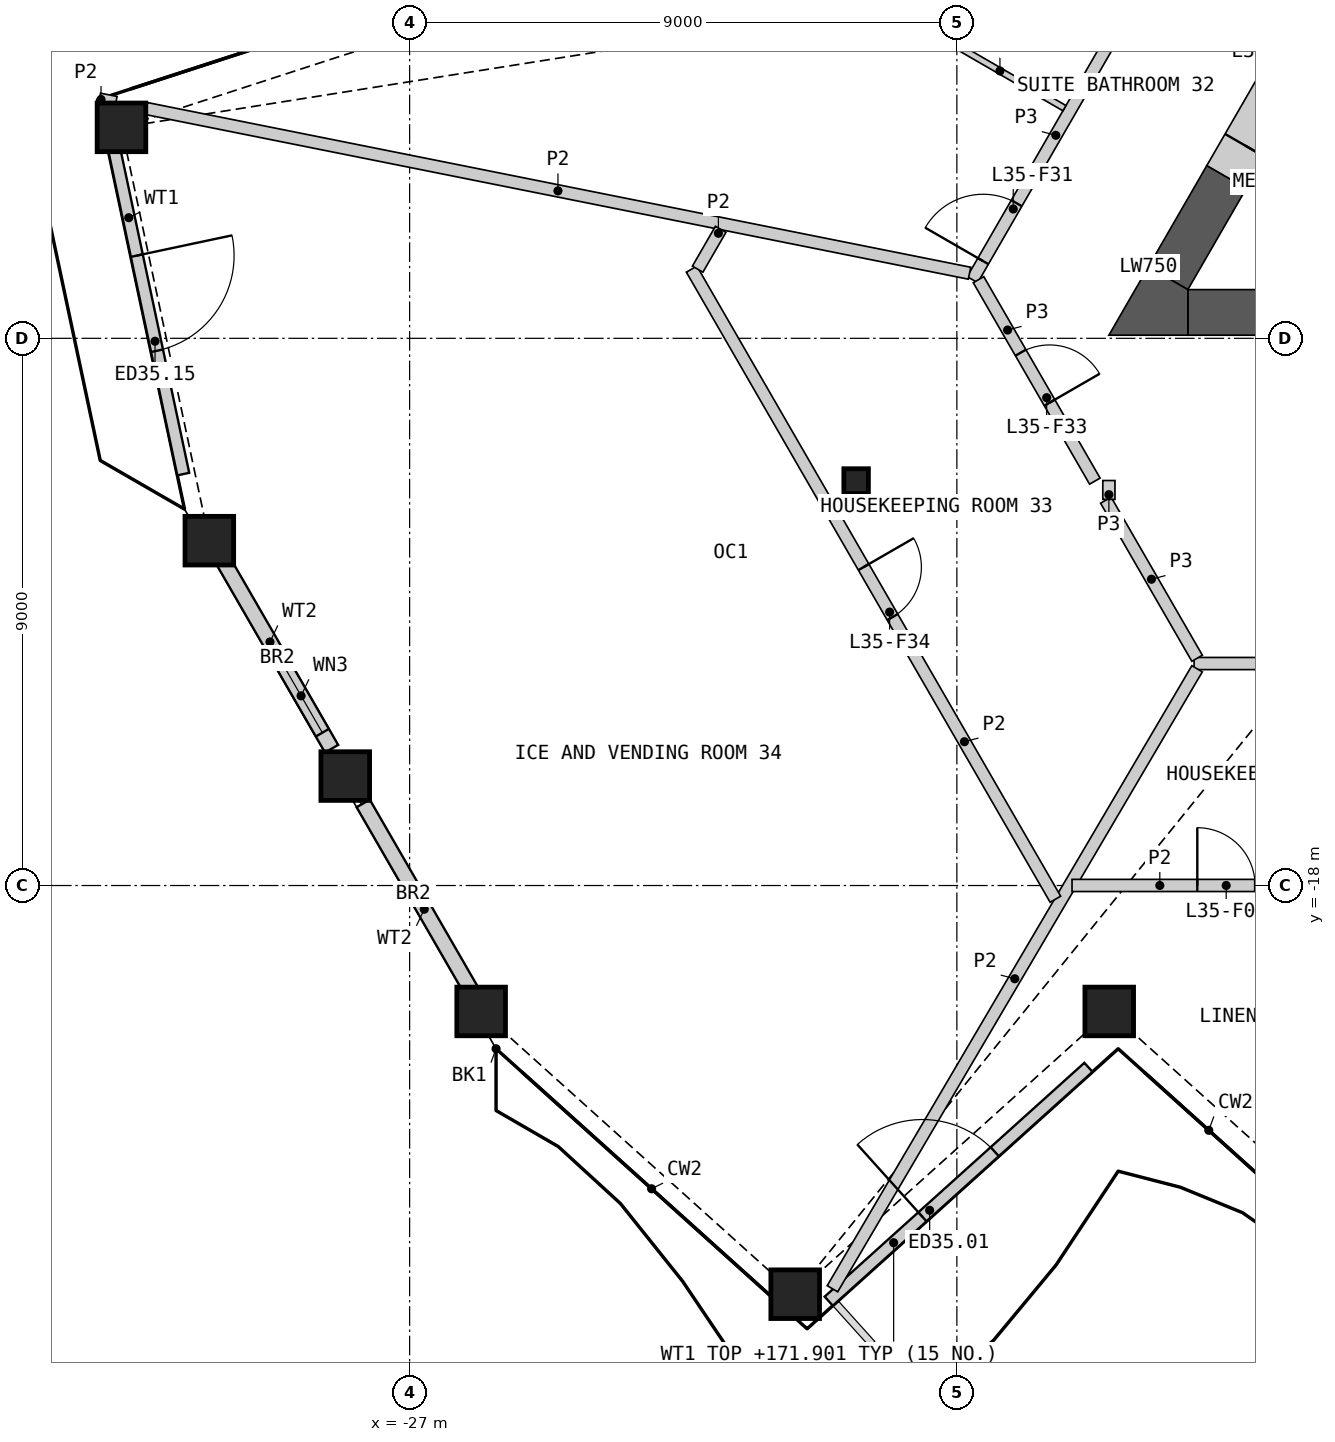
"""IFC4 building model, lengths in metres.
Left out: names, types, materials, properties, quantities, classifications, styles, units other than length and angle.
Written with IfcOpenShell. Run it as: python <this file> out.ifc"""

import sys

from ifc_helpers import new_model, si_unit, direction, frame, frame_2d, origin, origin_2d, place, context, subcontext, project, spatial, polyline, rectangle, hollow_rectangle, i_section, outline, extrude, element, fill, save


model = new_model("IFC4")
c1 = context("Model", 3, precision=1e-05, world=origin(), true_north=direction((0.0, 1.0)))
c2 = subcontext(c1, "Body", "Model", "MODEL_VIEW")
j1 = project(units=[si_unit("LENGTHUNIT", "METRE"), si_unit("PLANEANGLEUNIT", "RADIAN")], contexts=[c1])
p1 = place(None, origin())
s1 = spatial("IfcSite", under=j1, at=p1, CompositionType="ELEMENT")
p2 = place(p1, origin())
s2 = spatial("IfcBuilding", under=s1, at=p2, CompositionType="ELEMENT")
p3 = place(p2, frame((0.0, 0.0, 169.2)))
s3 = spatial("IfcBuildingStorey", under=s2, at=p3, CompositionType="ELEMENT", Elevation=169.2)
for number, where, z_axis, x_axis in (
    (1, (-25.823, -20.071, 0.0), (0.0, 0.0, 1.0), (1.0, 0.0, 0.0)),
    (2, (-20.659, -24.722, 0.0), (0.0, 0.0, 1.0), (1.0, 0.0, 0.0)),
    (3, (-15.494, -20.071, 0.0), (0.0, 0.0, 1.0), (1.0, 0.0, 0.0)),
    (4, (-31.739, -5.53, 0.0), (0.0, 0.0, 1.0), (1.0, 0.0, 0.0)),
    (5, (-30.294, -12.328, 0.0), (0.0, 0.0, 1.0), (1.0, 0.0, 0.0)),
    (6, (-28.059, -16.2, 0.0), (0.0, 0.0, 1.0), (1.0, 0.0, 0.0)),
):
    element("IfcColumn", number, at=place(p3, frame(where, z_axis=z_axis, x_axis=x_axis)), inside=s3, PredefinedType="COLUMN", context=c2, shape_type="SweptSolid", body=[
        extrude(hollow_rectangle(XDim=0.8, YDim=0.8, WallThickness=0.05, at=origin_2d()), origin(), (0.0, 0.0, 1.0), 3.6),
    ])
p4 = place(p3, frame((-19.657, -11.349, 0.0), z_axis=(0.0, 0.0, 1.0), x_axis=(1.0, 0.0, 0.0)))
e7 = element("IfcColumn", 7, at=p4, inside=s3, PredefinedType="COLUMN", context=c2, shape_type="SweptSolid", body=[
    extrude(i_section(OverallWidth=0.404, OverallDepth=0.407, WebThickness=0.027, FlangeThickness=0.044, at=origin_2d()), origin(), (0.0, 0.0, 1.0), 3.6),
])
p5 = place(p3, frame((-20.108, -24.836, 0.0), z_axis=(0.0, 0.0, 1.0), x_axis=(0.74315473474, 0.669119600844, 0.0)))
e8 = element("IfcWall", 8, at=p5, inside=s3, PredefinedType="SOLIDWALL", context=c2, shape_type="SweptSolid", body=[
    extrude(rectangle(XDim=5.748, YDim=0.2, at=frame_2d((2.874, 0.0))), origin(), (0.0, 0.0, 1.0), 2.701),
])
p6 = place(p5, frame((2.074, 0.0, 0.0)))
e9 = element("IfcOpeningElement", 9, at=p6, cuts=e8, PredefinedType="OPENING", context=c2, shape_type="SweptSolid", body=[
    extrude(rectangle(XDim=1.6, YDim=2.4, at=frame_2d((0.8, 1.2))), frame((0.0, 0.11, 0.0), z_axis=(0.0, -1.0, 0.0), x_axis=(1.0, 0.0, 0.0)), (0.0, 0.0, 1.0), 0.22),
])
p7 = place(p3, frame((-31.918, -5.611, 0.0), z_axis=(0.0, 0.0, 1.0), x_axis=(0.207913110781, -0.97814729891, 0.0)))
e10 = element("IfcWall", 10, at=p7, inside=s3, PredefinedType="SOLIDWALL", context=c2, shape_type="SweptSolid", body=[
    extrude(rectangle(XDim=5.748, YDim=0.2, at=frame_2d((2.874, 0.0))), origin(), (0.0, 0.0, 1.0), 2.701),
])
p8 = place(p7, frame((2.074, 0.0, 0.0)))
e11 = element("IfcOpeningElement", 11, at=p8, cuts=e10, PredefinedType="OPENING", context=c2, shape_type="SweptSolid", body=[
    extrude(rectangle(XDim=1.6, YDim=2.4, at=frame_2d((0.8, 1.2))), frame((0.0, 0.11, 0.0), z_axis=(0.0, -1.0, 0.0), x_axis=(1.0, 0.0, 0.0)), (0.0, 0.0, 1.0), 0.22),
])
p9 = place(p3, frame((-30.31, -12.239, 0.0), z_axis=(0.0, 0.0, 1.0), x_axis=(0.500005680777, -0.866022123962, 0.0)))
e12 = element("IfcWall", 12, at=p9, inside=s3, PredefinedType="SOLIDWALL", context=c2, shape_type="SweptSolid", body=[
    extrude(rectangle(XDim=4.054, YDim=0.25, at=frame_2d((2.027, 0.0))), origin(), (0.0, 0.0, 1.0), 2.701),
])
p10 = place(p9, frame((2.35, 0.0, 1.7)))
e13 = element("IfcOpeningElement", 13, at=p10, cuts=e12, PredefinedType="OPENING", context=c2, shape_type="SweptSolid", body=[
    extrude(rectangle(XDim=1.4, YDim=0.8, at=frame_2d((0.7, 0.4))), frame((0.0, 0.135, 0.0), z_axis=(0.0, -1.0, 0.0), x_axis=(1.0, 0.0, 0.0)), (0.0, 0.0, 1.0), 0.27),
])
p11 = place(p3, frame((-27.764, -16.65, 0.0), z_axis=(0.0, 0.0, 1.0), x_axis=(0.500039726511, -0.866002466458, 0.0)))
e14 = element("IfcWall", 14, at=p11, inside=s3, PredefinedType="SOLIDWALL", context=c2, shape_type="SweptSolid", body=[
    extrude(rectangle(XDim=4.019, YDim=0.25, at=frame_2d((2.009, 0.0))), origin(), (0.0, 0.0, 1.0), 2.701),
])
p12 = place(p3, frame((-14.201, -8.574, 0.0), z_axis=(0.0, 0.0, 1.0), x_axis=(1.0, 0.0, 0.0)))
e15 = element("IfcWall", 15, at=p12, inside=s3, PredefinedType="SHEAR", context=c2, shape_type="SweptSolid", body=[
    extrude(rectangle(XDim=6.785, YDim=0.75, at=frame_2d((3.393, 0.0))), origin(), (0.0, 0.0, 1.0), 3.25),
])
p13 = place(p3, frame((-13.564, -6.346, 0.0), z_axis=(0.0, 0.0, 1.0), x_axis=(-0.499989888488, -0.86603124159, 0.0)))
e16 = element("IfcWall", 16, at=p13, inside=s3, PredefinedType="SHEAR", context=c2, shape_type="SweptSolid", body=[
    extrude(rectangle(XDim=1.923, YDim=0.75, at=frame_2d((0.961, 0.0))), origin(), (0.0, 0.0, 1.0), 3.25),
])
p14 = place(p3, origin())
e17 = element("IfcWall", 17, at=p14, inside=s3, PredefinedType="SHEAR", context=c2, shape_type="SweptSolid", body=[
    extrude(outline(polyline([(-14.851, -7.824), (-14.201, -8.199), (-14.201, -8.949), (-15.5, -8.949), (-14.851, -7.824)])), origin(), (0.0, 0.0, 1.0), 3.25),
])
p15 = place(p3, frame((-12.464, -4.441, 0.0), z_axis=(0.0, 0.0, 1.0), x_axis=(-0.499994660107, -0.866028486751, 0.0)))
e18 = element("IfcWall", 18, at=p15, inside=s3, PredefinedType="SHEAR", context=c2, shape_type="SweptSolid", body=[
    extrude(rectangle(XDim=2.2, YDim=0.75, at=frame_2d((1.1, 0.0))), origin(), (0.0, 0.0, 1.0), 3.25),
])
p16 = place(p15, frame((0.6, 0.0, 0.0)))
e19 = element("IfcOpeningElement", 19, at=p16, cuts=e18, PredefinedType="OPENING", context=c2, shape_type="SweptSolid", body=[
    extrude(rectangle(XDim=1.0, YDim=2.1, at=frame_2d((0.5, 1.05))), frame((0.0, 0.385, 0.0), z_axis=(0.0, -1.0, 0.0), x_axis=(1.0, 0.0, 0.0)), (0.0, 0.0, 1.0), 0.77),
])
p17 = place(p3, frame((-14.099, -14.349, 0.0), z_axis=(0.0, 0.0, 1.0), x_axis=(1.0, 0.0, 0.0)))
e20 = element("IfcWall", 20, at=p17, inside=s3, PredefinedType="PARTITIONING", context=c2, shape_type="SweptSolid", body=[
    extrude(rectangle(XDim=28.198, YDim=0.2, at=frame_2d((14.099, 0.0))), origin(), (0.0, 0.0, 1.0), 3.25),
])
p18 = place(p17, frame((1.552, 0.0, 0.0)))
e21 = element("IfcOpeningElement", 21, at=p18, cuts=e20, PredefinedType="OPENING", context=c2, shape_type="SweptSolid", body=[
    extrude(rectangle(XDim=0.95, YDim=2.1, at=frame_2d((0.475, 1.05))), frame((0.0, 0.11, 0.0), z_axis=(0.0, -1.0, 0.0), x_axis=(1.0, 0.0, 0.0)), (0.0, 0.0, 1.0), 0.22),
])
p19 = place(p17, frame((7.677, 0.0, 0.0)))
e22 = element("IfcOpeningElement", 22, at=p19, cuts=e20, PredefinedType="OPENING", context=c2, shape_type="SweptSolid", body=[
    extrude(rectangle(XDim=1.0, YDim=2.1, at=frame_2d((0.5, 1.05))), frame((0.0, 0.11, 0.0), z_axis=(0.0, -1.0, 0.0), x_axis=(1.0, 0.0, 0.0)), (0.0, 0.0, 1.0), 0.22),
])
p20 = place(p17, frame((9.283, 0.0, 0.0)))
e23 = element("IfcOpeningElement", 23, at=p20, cuts=e20, PredefinedType="OPENING", context=c2, shape_type="SweptSolid", body=[
    extrude(rectangle(XDim=1.0, YDim=2.1, at=frame_2d((0.5, 1.05))), frame((0.0, 0.11, 0.0), z_axis=(0.0, -1.0, 0.0), x_axis=(1.0, 0.0, 0.0)), (0.0, 0.0, 1.0), 0.22),
])
p21 = place(p17, frame((17.915, 0.0, 0.0)))
e24 = element("IfcOpeningElement", 24, at=p21, cuts=e20, PredefinedType="OPENING", context=c2, shape_type="SweptSolid", body=[
    extrude(rectangle(XDim=1.0, YDim=2.1, at=frame_2d((0.5, 1.05))), frame((0.0, 0.11, 0.0), z_axis=(0.0, -1.0, 0.0), x_axis=(1.0, 0.0, 0.0)), (0.0, 0.0, 1.0), 0.22),
])
p22 = place(p17, frame((19.521, 0.0, 0.0)))
e25 = element("IfcOpeningElement", 25, at=p22, cuts=e20, PredefinedType="OPENING", context=c2, shape_type="SweptSolid", body=[
    extrude(rectangle(XDim=1.0, YDim=2.1, at=frame_2d((0.5, 1.05))), frame((0.0, 0.11, 0.0), z_axis=(0.0, -1.0, 0.0), x_axis=(1.0, 0.0, 0.0)), (0.0, 0.0, 1.0), 0.22),
])
p23 = place(p17, frame((25.696, 0.0, 0.0)))
e26 = element("IfcOpeningElement", 26, at=p23, cuts=e20, PredefinedType="OPENING", context=c2, shape_type="SweptSolid", body=[
    extrude(rectangle(XDim=0.95, YDim=2.1, at=frame_2d((0.475, 1.05))), frame((0.0, 0.11, 0.0), z_axis=(0.0, -1.0, 0.0), x_axis=(1.0, 0.0, 0.0)), (0.0, 0.0, 1.0), 0.22),
])
p24 = place(p3, frame((-17.744, -8.035, 0.0), z_axis=(0.0, 0.0, 1.0), x_axis=(0.500007607708, 0.866021011428, 0.0)))
e27 = element("IfcWall", 27, at=p24, inside=s3, PredefinedType="PARTITIONING", context=c2, shape_type="SweptSolid", body=[
    extrude(rectangle(XDim=5.484, YDim=0.2, at=frame_2d((2.742, 0.0))), origin(), (0.0, 0.0, 1.0), 3.25),
])
p25 = place(p24, frame((0.352, 0.0, 0.0)))
e28 = element("IfcOpeningElement", 28, at=p25, cuts=e27, PredefinedType="OPENING", context=c2, shape_type="SweptSolid", body=[
    extrude(rectangle(XDim=1.1, YDim=2.1, at=frame_2d((0.55, 1.05))), frame((0.0, 0.11, 0.0), z_axis=(0.0, -1.0, 0.0), x_axis=(1.0, 0.0, 0.0)), (0.0, 0.0, 1.0), 0.22),
])
p26 = place(p3, frame((-17.644, -8.035, 0.0), z_axis=(0.0, 0.0, 1.0), x_axis=(0.499961815444, -0.866047448526, 0.0)))
e29 = element("IfcWall", 29, at=p26, inside=s3, PredefinedType="PARTITIONING", context=c2, shape_type="SweptSolid", body=[
    extrude(rectangle(XDim=3.826, YDim=0.2, at=frame_2d((1.913, 0.0))), origin(), (0.0, 0.0, 1.0), 3.25),
])
p27 = place(p26, frame((1.386, 0.0, 0.0)))
e30 = element("IfcOpeningElement", 30, at=p27, cuts=e29, PredefinedType="OPENING", context=c2, shape_type="SweptSolid", body=[
    extrude(rectangle(XDim=0.95, YDim=2.1, at=frame_2d((0.475, 1.05))), frame((0.0, 0.11, 0.0), z_axis=(0.0, -1.0, 0.0), x_axis=(1.0, 0.0, 0.0)), (0.0, 0.0, 1.0), 0.22),
])
p28 = place(p3, frame((-15.55, -11.662, 0.0), z_axis=(0.0, 0.0, 1.0), x_axis=(0.500048608389, -0.865997337899, 0.0)))
e31 = element("IfcWall", 31, at=p28, inside=s3, PredefinedType="PARTITIONING", context=c2, shape_type="SweptSolid", body=[
    extrude(rectangle(XDim=3.002, YDim=0.2, at=frame_2d((1.501, 0.0))), origin(), (0.0, 0.0, 1.0), 3.25),
])
p29 = place(p3, frame((-15.5, -11.649, 0.0), z_axis=(0.0, 0.0, 1.0), x_axis=(0.0, 1.0, 0.0)))
e32 = element("IfcWall", 32, at=p29, inside=s3, PredefinedType="PARTITIONING", context=c2, shape_type="SweptSolid", body=[
    extrude(rectangle(XDim=0.31, YDim=0.2, at=frame_2d((0.155, 0.0))), origin(), (0.0, 0.0, 1.0), 3.25),
])
p30 = place(p3, frame((-31.329, -5.221, 0.0), z_axis=(0.0, 0.0, 1.0), x_axis=(0.980565709097, -0.196190953266, 0.0)))
e33 = element("IfcWall", 33, at=p30, inside=s3, PredefinedType="PARTITIONING", context=c2, shape_type="SweptSolid", body=[
    extrude(rectangle(XDim=13.805, YDim=0.2, at=frame_2d((6.903, 0.0))), origin(), (0.0, 0.0, 1.0), 2.404),
])
p31 = place(p3, frame((-20.046, -24.632, 0.0), z_axis=(0.0, 0.0, 1.0), x_axis=(0.50691549935, 0.86199575203, 0.0)))
e34 = element("IfcWall", 34, at=p31, inside=s3, PredefinedType="PARTITIONING", context=c2, shape_type="SweptSolid", body=[
    extrude(rectangle(XDim=11.83, YDim=0.2, at=frame_2d((5.915, 0.0))), origin(), (0.0, 0.0, 1.0), 2.404),
])
p32 = place(p3, frame((-22.363, -7.862, 0.0), z_axis=(0.0, 0.0, 1.0), x_axis=(0.500009728207, -0.866019787128, 0.0)))
e35 = element("IfcWall", 35, at=p32, inside=s3, PredefinedType="PARTITIONING", context=c2, shape_type="SweptSolid", body=[
    extrude(rectangle(XDim=11.967, YDim=0.2, at=frame_2d((5.983, 0.0))), origin(), (0.0, 0.0, 1.0), 2.404),
])
p33 = place(p32, frame((5.658, 0.0, 0.0)))
e36 = element("IfcOpeningElement", 36, at=p33, cuts=e35, PredefinedType="OPENING", context=c2, shape_type="SweptSolid", body=[
    extrude(rectangle(XDim=0.95, YDim=2.1, at=frame_2d((0.475, 1.05))), frame((0.0, 0.11, 0.0), z_axis=(0.0, -1.0, 0.0), x_axis=(1.0, 0.0, 0.0)), (0.0, 0.0, 1.0), 0.22),
])
p34 = place(p3, frame((-16.106, -17.999, 0.0), z_axis=(0.0, 0.0, 1.0), x_axis=(1.0, 0.0, 0.0)))
e37 = element("IfcWall", 37, at=p34, inside=s3, PredefinedType="PARTITIONING", context=c2, shape_type="SweptSolid", body=[
    extrude(rectangle(XDim=5.775, YDim=0.2, at=frame_2d((2.887, 0.0))), origin(), (0.0, 0.0, 1.0), 2.404),
])
p35 = place(p34, frame((2.06, 0.0, 0.0)))
e38 = element("IfcOpeningElement", 38, at=p35, cuts=e37, PredefinedType="OPENING", context=c2, shape_type="SweptSolid", body=[
    extrude(rectangle(XDim=0.95, YDim=2.1, at=frame_2d((0.475, 1.05))), frame((0.0, 0.11, 0.0), z_axis=(0.0, -1.0, 0.0), x_axis=(1.0, 0.0, 0.0)), (0.0, 0.0, 1.0), 0.22),
])
p36 = place(p3, frame((-22.263, -7.862, 0.0), z_axis=(0.0, 0.0, 1.0), x_axis=(0.499852814723, 0.866110364569, 0.0)))
e39 = element("IfcWall", 39, at=p36, inside=s3, PredefinedType="PARTITIONING", context=c2, shape_type="SweptSolid", body=[
    extrude(rectangle(XDim=0.757, YDim=0.2, at=frame_2d((0.378, 0.0))), origin(), (0.0, 0.0, 1.0), 2.404),
])
p37 = place(p3, frame((-32.103, -5.066, 0.0), z_axis=(0.0, 0.0, 1.0), x_axis=(0.980512850695, -0.19645495571, 0.0)))
e40 = element("IfcWall", 40, at=p37, inside=s3, PredefinedType="PARTITIONING", context=c2, shape_type="SweptSolid", body=[
    extrude(rectangle(XDim=0.277, YDim=0.2, at=frame_2d((0.139, 0.0))), origin(), (0.0, 0.0, 1.0), 2.404),
])
p38 = place(p3, frame((-18.353, -3.99, 0.0), z_axis=(0.0, 0.0, 1.0), x_axis=(0.866057815567, -0.499943856944, 0.0)))
e41 = element("IfcWall", 41, at=p38, inside=s3, PredefinedType="PARTITIONING", context=c2, shape_type="SweptSolid", body=[
    extrude(rectangle(XDim=2.45, YDim=0.1, at=frame_2d((1.225, 0.0))), origin(), (0.0, 0.0, 1.0), 2.404),
])
p39 = place(p6, origin())
e42 = element("IfcDoor", 42, at=p39, inside=s3, OperationType="DOUBLE_DOOR_SINGLE_SWING", PredefinedType="DOOR", context=c2, shape_type="SweptSolid", body=[
    extrude(rectangle(XDim=1.6, YDim=2.4, at=frame_2d((0.8, 1.2))), frame((0.0, 0.025, 0.0), z_axis=(0.0, -1.0, 0.0), x_axis=(1.0, 0.0, 0.0)), (0.0, 0.0, 1.0), 0.05),
])
fill(e9, e42)
p40 = place(p8, origin())
e43 = element("IfcDoor", 43, at=p40, inside=s3, OperationType="DOUBLE_DOOR_SINGLE_SWING", PredefinedType="DOOR", context=c2, shape_type="SweptSolid", body=[
    extrude(rectangle(XDim=1.6, YDim=2.4, at=frame_2d((0.8, 1.2))), frame((0.0, 0.025, 0.0), z_axis=(0.0, -1.0, 0.0), x_axis=(1.0, 0.0, 0.0)), (0.0, 0.0, 1.0), 0.05),
])
fill(e11, e43)
p41 = place(p10, origin())
e44 = element("IfcWindow", 44, at=p41, inside=s3, PartitioningType="SINGLE_PANEL", PredefinedType="WINDOW", context=c2, shape_type="SweptSolid", body=[
    extrude(rectangle(XDim=1.4, YDim=0.8, at=frame_2d((0.7, 0.4))), frame((0.0, 0.03, 0.0), z_axis=(0.0, -1.0, 0.0), x_axis=(1.0, 0.0, 0.0)), (0.0, 0.0, 1.0), 0.06),
])
fill(e13, e44)
p42 = place(p16, origin())
e45 = element("IfcDoor", 45, at=p42, inside=s3, OperationType="SINGLE_SWING_RIGHT", PredefinedType="DOOR", context=c2, shape_type="SweptSolid", body=[
    extrude(rectangle(XDim=1.0, YDim=2.1, at=frame_2d((0.5, 1.05))), frame((0.0, 0.13, 0.0), z_axis=(0.0, -1.0, 0.0), x_axis=(1.0, 0.0, 0.0)), (0.0, 0.0, 1.0), 0.05),
])
fill(e19, e45)
p43 = place(p35, origin())
e46 = element("IfcDoor", 46, at=p43, inside=s3, OperationType="SINGLE_SWING_LEFT", PredefinedType="DOOR", context=c2, shape_type="SweptSolid", body=[
    extrude(rectangle(XDim=0.95, YDim=2.1, at=frame_2d((0.475, 1.05))), frame((0.0, 0.025, 0.0), z_axis=(0.0, -1.0, 0.0), x_axis=(1.0, 0.0, 0.0)), (0.0, 0.0, 1.0), 0.05),
])
fill(e38, e46)
p44 = place(p25, origin())
e47 = element("IfcDoor", 47, at=p44, inside=s3, OperationType="SINGLE_SWING_LEFT", PredefinedType="DOOR", context=c2, shape_type="SweptSolid", body=[
    extrude(rectangle(XDim=1.1, YDim=2.1, at=frame_2d((0.55, 1.05))), frame((0.0, 0.025, 0.0), z_axis=(0.0, -1.0, 0.0), x_axis=(1.0, 0.0, 0.0)), (0.0, 0.0, 1.0), 0.05),
])
fill(e28, e47)
p45 = place(p27, origin())
e48 = element("IfcDoor", 48, at=p45, inside=s3, OperationType="SINGLE_SWING_RIGHT", PredefinedType="DOOR", context=c2, shape_type="SweptSolid", body=[
    extrude(rectangle(XDim=0.95, YDim=2.1, at=frame_2d((0.475, 1.05))), frame((0.0, 0.025, 0.0), z_axis=(0.0, -1.0, 0.0), x_axis=(1.0, 0.0, 0.0)), (0.0, 0.0, 1.0), 0.05),
])
fill(e30, e48)
p46 = place(p33, origin())
e49 = element("IfcDoor", 49, at=p46, inside=s3, OperationType="SINGLE_SWING_LEFT", PredefinedType="DOOR", context=c2, shape_type="SweptSolid", body=[
    extrude(rectangle(XDim=0.95, YDim=2.1, at=frame_2d((0.475, 1.05))), frame((0.0, 0.025, 0.0), z_axis=(0.0, -1.0, 0.0), x_axis=(1.0, 0.0, 0.0)), (0.0, 0.0, 1.0), 0.05),
])
fill(e36, e49)
save(model, sys.argv[1])
